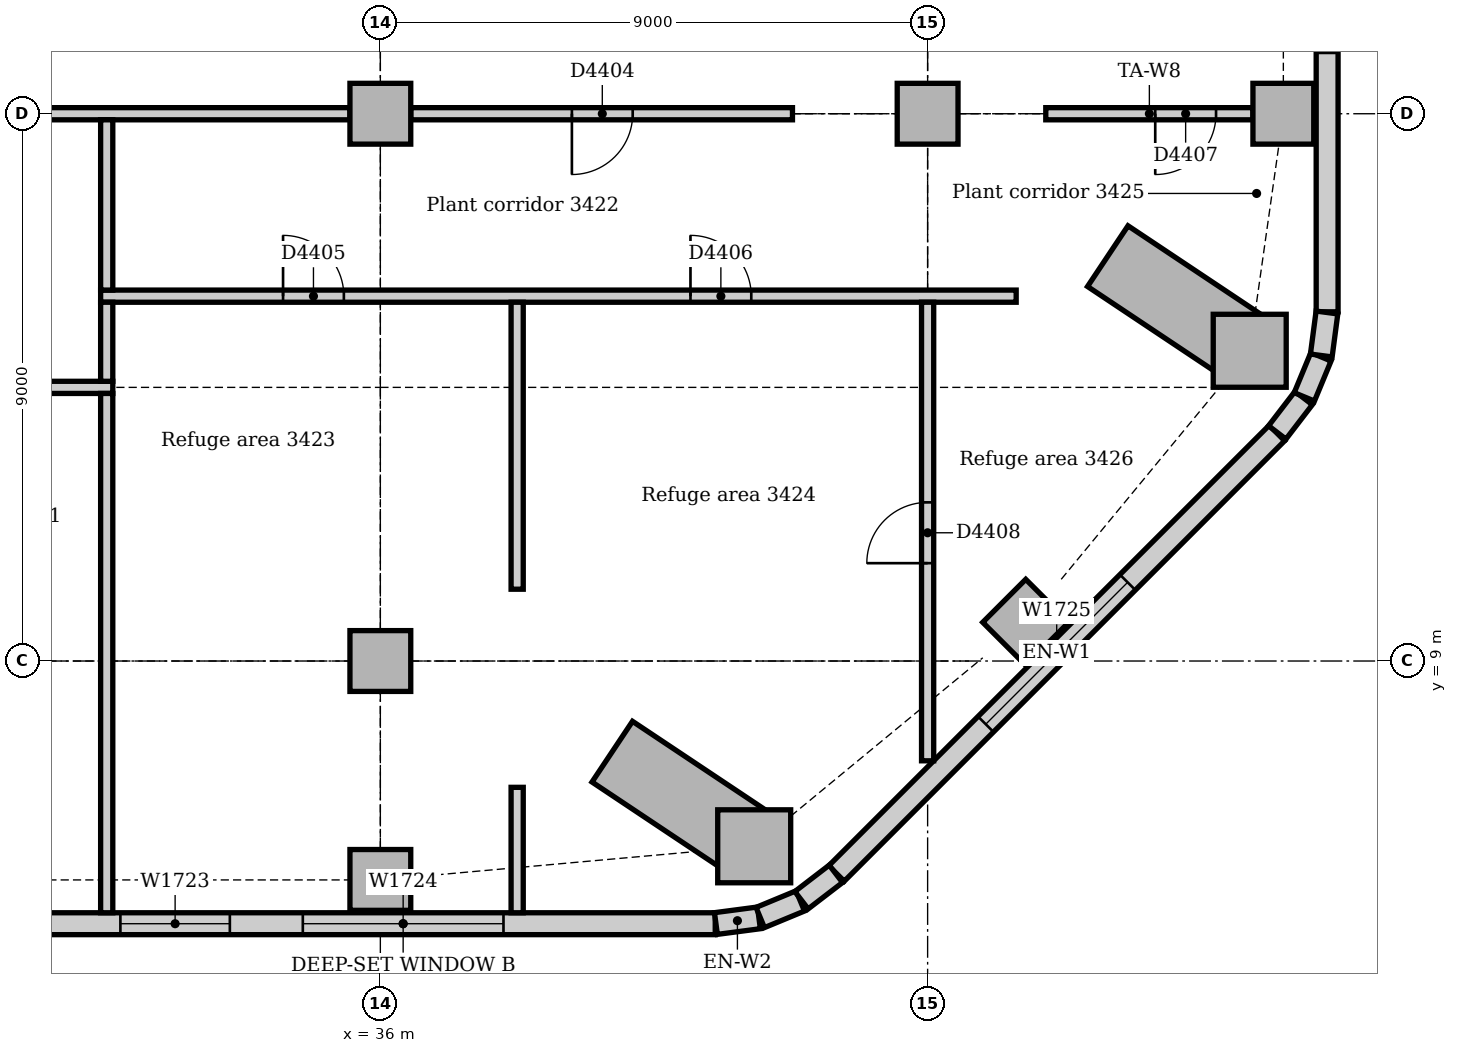
"""IFC4 building model, lengths in metres.
Left out: names, types, materials, properties, quantities, classifications, styles, units other than length and angle.
Written with IfcOpenShell. Run it as: python <this file> out.ifc"""

import sys

from ifc_helpers import new_model, si_unit, direction, frame, frame_2d, origin, origin_2d, place, context, subcontext, project, spatial, rectangle, extrude, element, fill, save


model = new_model("IFC4")
c1 = context("Model", 3, precision=1e-05, world=origin(), true_north=direction((0.0, 1.0)))
c2 = subcontext(c1, "Body", "Model", "MODEL_VIEW")
j1 = project(units=[si_unit("LENGTHUNIT", "METRE"), si_unit("PLANEANGLEUNIT", "RADIAN")], contexts=[c1])
p1 = place(None, origin())
s1 = spatial("IfcSite", under=j1, at=p1, CompositionType="ELEMENT")
p2 = place(p1, origin())
s2 = spatial("IfcBuilding", under=s1, at=p2, CompositionType="ELEMENT")
p3 = place(p2, frame((0.0, 0.0, 144.0)))
s3 = spatial("IfcBuildingStorey", under=s2, at=p3, CompositionType="ELEMENT", Elevation=144.0)
for number, where, z_axis, x_axis in (
    (1, (42.148, 5.953, 0.0), (0.0, 0.0, 1.0), (1.0, 0.0, 0.0)),
    (2, (50.297, 14.102, 0.0), (0.0, 0.0, 1.0), (1.0, 0.0, 0.0)),
):
    element("IfcColumn", number, at=place(p3, frame(where, z_axis=z_axis, x_axis=x_axis)), inside=s3, PredefinedType="COLUMN", context=c2, shape_type="SweptSolid", body=[
        extrude(rectangle(XDim=1.2, YDim=1.2, at=origin_2d()), origin(), (0.0, 0.0, 1.0), 4.85),
    ])
for number, where, z_axis, x_axis in (
    (3, (36.0, 5.4, 0.0), (0.0, 0.0, 1.0), (1.0, 0.0, 0.0)),
    (4, (46.614, 9.636, 0.0), (0.0, 0.0, 1.0), (0.707, 0.707, 0.0)),
    (5, (50.85, 18.0, 0.0), (0.0, 0.0, 1.0), (1.0, 0.0, 0.0)),
    (6, (36.0, 9.0, 0.0), (0.0, 0.0, 1.0), (1.0, 0.0, 0.0)),
    (7, (36.0, 18.0, 0.0), (0.0, 0.0, 1.0), (1.0, 0.0, 0.0)),
    (8, (45.0, 18.0, 0.0), (0.0, 0.0, 1.0), (1.0, 0.0, 0.0)),
):
    element("IfcColumn", number, at=place(p3, frame(where, z_axis=z_axis, x_axis=x_axis)), inside=s3, PredefinedType="COLUMN", context=c2, shape_type="SweptSolid", body=[
        extrude(rectangle(XDim=1.0, YDim=1.0, at=origin_2d()), origin(), (0.0, 0.0, 1.0), 4.85),
    ])
p4 = place(p3, frame((4.243, 4.68, 0.0), z_axis=(0.0, 0.0, 1.0), x_axis=(1.0, 0.0, 0.0)))
e9 = element("IfcWall", 9, at=p4, inside=s3, PredefinedType="STANDARD", context=c2, shape_type="SweptSolid", body=[
    extrude(rectangle(XDim=37.265, YDim=0.36, at=frame_2d((18.632, 0.0))), origin(), (0.0, 0.0, 1.0), 4.85),
])
p5 = place(p4, frame((9.482, 0.0, 0.9)))
e10 = element("IfcOpeningElement", 10, at=p5, cuts=e9, PredefinedType="OPENING", context=c2, shape_type="SweptSolid", body=[
    extrude(rectangle(XDim=1.8, YDim=2.2, at=frame_2d((0.9, 1.1))), frame((0.0, 0.19, 0.0), z_axis=(0.0, -1.0, 0.0), x_axis=(1.0, 0.0, 0.0)), (0.0, 0.0, 1.0), 0.38),
])
p6 = place(p4, frame((18.482, 0.0, 0.9)))
e11 = element("IfcOpeningElement", 11, at=p6, cuts=e9, PredefinedType="OPENING", context=c2, shape_type="SweptSolid", body=[
    extrude(rectangle(XDim=1.8, YDim=2.2, at=frame_2d((0.9, 1.1))), frame((0.0, 0.19, 0.0), z_axis=(0.0, -1.0, 0.0), x_axis=(1.0, 0.0, 0.0)), (0.0, 0.0, 1.0), 0.38),
])
p7 = place(p4, frame((27.482, 0.0, 0.9)))
e12 = element("IfcOpeningElement", 12, at=p7, cuts=e9, PredefinedType="OPENING", context=c2, shape_type="SweptSolid", body=[
    extrude(rectangle(XDim=1.8, YDim=2.2, at=frame_2d((0.9, 1.1))), frame((0.0, 0.19, 0.0), z_axis=(0.0, -1.0, 0.0), x_axis=(1.0, 0.0, 0.0)), (0.0, 0.0, 1.0), 0.38),
])
p8 = place(p4, frame((30.482, 0.0, 0.9)))
e13 = element("IfcOpeningElement", 13, at=p8, cuts=e9, PredefinedType="OPENING", context=c2, shape_type="SweptSolid", body=[
    extrude(rectangle(XDim=3.3, YDim=2.2, at=frame_2d((1.65, 1.1))), frame((0.0, 0.19, 0.0), z_axis=(0.0, -1.0, 0.0), x_axis=(1.0, 0.0, 0.0)), (0.0, 0.0, 1.0), 0.38),
])
p9 = place(p3, frame((43.501, 5.506, 0.0), z_axis=(0.0, 0.0, 1.0), x_axis=(0.707106781187, 0.707106781187, 0.0)))
e14 = element("IfcWall", 14, at=p9, inside=s3, PredefinedType="STANDARD", context=c2, shape_type="SweptSolid", body=[
    extrude(rectangle(XDim=10.243, YDim=0.36, at=frame_2d((5.121, 0.0))), origin(), (0.0, 0.0, 1.0), 4.85),
])
p10 = place(p9, frame((3.471, 0.0, 0.9)))
e15 = element("IfcOpeningElement", 15, at=p10, cuts=e14, PredefinedType="OPENING", context=c2, shape_type="SweptSolid", body=[
    extrude(rectangle(XDim=3.3, YDim=2.2, at=frame_2d((1.65, 1.1))), frame((0.0, 0.19, 0.0), z_axis=(0.0, -1.0, 0.0), x_axis=(1.0, 0.0, 0.0)), (0.0, 0.0, 1.0), 0.38),
])
p11 = place(p3, frame((51.57, 14.743, 0.0), z_axis=(0.0, 0.0, 1.0), x_axis=(0.0, 1.0, 0.0)))
e16 = element("IfcWall", 16, at=p11, inside=s3, PredefinedType="STANDARD", context=c2, shape_type="SweptSolid", body=[
    extrude(rectangle(XDim=24.515, YDim=0.36, at=frame_2d((12.257, 0.0))), origin(), (0.0, 0.0, 1.0), 4.85),
])
p12 = place(p11, frame((4.257, 0.0, 0.9)))
e17 = element("IfcOpeningElement", 17, at=p12, cuts=e16, PredefinedType="OPENING", context=c2, shape_type="SweptSolid", body=[
    extrude(rectangle(XDim=1.8, YDim=2.2, at=frame_2d((0.9, 1.1))), frame((0.0, 0.19, 0.0), z_axis=(0.0, -1.0, 0.0), x_axis=(1.0, 0.0, 0.0)), (0.0, 0.0, 1.0), 0.38),
])
p13 = place(p11, frame((8.007, 0.0, 1.2)))
e18 = element("IfcOpeningElement", 18, at=p13, cuts=e16, PredefinedType="OPENING", context=c2, shape_type="SweptSolid", body=[
    extrude(rectangle(XDim=1.8, YDim=1.2, at=frame_2d((0.9, 0.6))), frame((0.0, 0.19, 0.0), z_axis=(0.0, -1.0, 0.0), x_axis=(1.0, 0.0, 0.0)), (0.0, 0.0, 1.0), 0.38),
])
p14 = place(p11, frame((14.682, 0.0, 0.9)))
e19 = element("IfcOpeningElement", 19, at=p14, cuts=e16, PredefinedType="OPENING", context=c2, shape_type="SweptSolid", body=[
    extrude(rectangle(XDim=1.8, YDim=2.2, at=frame_2d((0.9, 1.1))), frame((0.0, 0.19, 0.0), z_axis=(0.0, -1.0, 0.0), x_axis=(1.0, 0.0, 0.0)), (0.0, 0.0, 1.0), 0.38),
])
p15 = place(p11, frame((17.732, 0.0, 0.9)))
e20 = element("IfcOpeningElement", 20, at=p15, cuts=e16, PredefinedType="OPENING", context=c2, shape_type="SweptSolid", body=[
    extrude(rectangle(XDim=1.8, YDim=2.2, at=frame_2d((0.9, 1.1))), frame((0.0, 0.19, 0.0), z_axis=(0.0, -1.0, 0.0), x_axis=(1.0, 0.0, 0.0)), (0.0, 0.0, 1.0), 0.38),
])
for number, where, z_axis, x_axis in (
    (21, (41.519, 4.683, 0.0), (0.0, 0.0, 1.0), (0.991, 0.131, 0.0)),
    (22, (42.247, 4.782, 0.0), (0.0, 0.0, 1.0), (0.924, 0.383, 0.0)),
):
    element("IfcWall", number, at=place(p3, frame(where, z_axis=z_axis, x_axis=x_axis)), inside=s3, PredefinedType="STANDARD", context=c2, shape_type="SweptSolid", body=[
        extrude(rectangle(XDim=0.713, YDim=0.36, at=frame_2d((0.356, 0.0))), origin(), (0.0, 0.0, 1.0), 4.85),
    ])
for number, where, z_axis, x_axis in (
    (23, (42.925, 5.066, 0.0), (0.0, 0.0, 1.0), (0.793, 0.609, 0.0)),
    (24, (50.75, 12.759, 0.0), (0.0, 0.0, 1.0), (0.609, 0.793, 0.0)),
):
    element("IfcWall", number, at=place(p3, frame(where, z_axis=z_axis, x_axis=x_axis)), inside=s3, PredefinedType="STANDARD", context=c2, shape_type="SweptSolid", body=[
        extrude(rectangle(XDim=0.713, YDim=0.36, at=frame_2d((0.357, 0.0))), origin(), (0.0, 0.0, 1.0), 4.85),
    ])
for number, where, z_axis, x_axis in (
    (25, (51.195, 13.344, 0.0), (0.0, 0.0, 1.0), (0.383, 0.924, 0.0)),
    (26, (51.474, 14.024, 0.0), (0.0, 0.0, 1.0), (0.131, 0.991, 0.0)),
):
    element("IfcWall", number, at=place(p3, frame(where, z_axis=z_axis, x_axis=x_axis)), inside=s3, PredefinedType="STANDARD", context=c2, shape_type="SweptSolid", body=[
        extrude(rectangle(XDim=0.713, YDim=0.36, at=frame_2d((0.356, 0.0))), origin(), (0.0, 0.0, 1.0), 4.85),
    ])
p16 = place(p3, frame((46.943, 18.0, 0.0), z_axis=(0.0, 0.0, 1.0), x_axis=(1.0, 0.0, 0.0)))
e27 = element("IfcWall", 27, at=p16, inside=s3, PredefinedType="PARTITIONING", context=c2, shape_type="SweptSolid", body=[
    extrude(rectangle(XDim=3.407, YDim=0.2, at=frame_2d((1.703, 0.0))), origin(), (0.0, 0.0, 1.0), 4.35),
])
p17 = place(p16, frame((1.8, 0.0, 0.0)))
e28 = element("IfcOpeningElement", 28, at=p17, cuts=e27, PredefinedType="OPENING", context=c2, shape_type="SweptSolid", body=[
    extrude(rectangle(XDim=1.0, YDim=2.1, at=frame_2d((0.5, 1.05))), frame((0.0, 0.11, 0.0), z_axis=(0.0, -1.0, 0.0), x_axis=(1.0, 0.0, 0.0)), (0.0, 0.0, 1.0), 0.22),
])
p18 = place(p3, frame((36.5, 18.0, 0.0), z_axis=(0.0, 0.0, 1.0), x_axis=(1.0, 0.0, 0.0)))
e29 = element("IfcWall", 29, at=p18, inside=s3, PredefinedType="PARTITIONING", context=c2, shape_type="SweptSolid", body=[
    extrude(rectangle(XDim=6.277, YDim=0.2, at=frame_2d((3.139, 0.0))), origin(), (0.0, 0.0, 1.0), 4.35),
])
p19 = place(p18, frame((2.65, 0.0, 0.0)))
e30 = element("IfcOpeningElement", 30, at=p19, cuts=e29, PredefinedType="OPENING", context=c2, shape_type="SweptSolid", body=[
    extrude(rectangle(XDim=1.0, YDim=2.1, at=frame_2d((0.5, 1.05))), frame((0.0, 0.11, 0.0), z_axis=(0.0, -1.0, 0.0), x_axis=(1.0, 0.0, 0.0)), (0.0, 0.0, 1.0), 0.22),
])
p20 = place(p3, frame((27.5, 18.0, 0.0), z_axis=(0.0, 0.0, 1.0), x_axis=(1.0, 0.0, 0.0)))
e31 = element("IfcWall", 31, at=p20, inside=s3, PredefinedType="PARTITIONING", context=c2, shape_type="SweptSolid", body=[
    extrude(rectangle(XDim=8.0, YDim=0.2, at=frame_2d((4.0, 0.0))), origin(), (0.0, 0.0, 1.0), 4.262),
])
p21 = place(p3, frame((0.36, 13.5, 0.0), z_axis=(0.0, 0.0, 1.0), x_axis=(1.0, 0.0, 0.0)))
e32 = element("IfcWall", 32, at=p21, inside=s3, PredefinedType="PARTITIONING", context=c2, shape_type="SweptSolid", body=[
    extrude(rectangle(XDim=31.24, YDim=0.2, at=frame_2d((15.62, 0.0))), origin(), (0.0, 0.0, 1.0), 4.4),
])
p22 = place(p21, frame((2.75, 0.0, 0.0)))
e33 = element("IfcOpeningElement", 33, at=p22, cuts=e32, PredefinedType="OPENING", context=c2, shape_type="SweptSolid", body=[
    extrude(rectangle(XDim=1.0, YDim=2.1, at=frame_2d((0.5, 1.05))), frame((0.0, 0.11, 0.0), z_axis=(0.0, -1.0, 0.0), x_axis=(1.0, 0.0, 0.0)), (0.0, 0.0, 1.0), 0.22),
])
p23 = place(p21, frame((9.24, 0.0, 0.0)))
e34 = element("IfcOpeningElement", 34, at=p23, cuts=e32, PredefinedType="OPENING", context=c2, shape_type="SweptSolid", body=[
    extrude(rectangle(XDim=1.0, YDim=2.1, at=frame_2d((0.5, 1.05))), frame((0.0, 0.11, 0.0), z_axis=(0.0, -1.0, 0.0), x_axis=(1.0, 0.0, 0.0)), (0.0, 0.0, 1.0), 0.22),
])
p24 = place(p21, frame((17.14, 0.0, 0.0)))
e35 = element("IfcOpeningElement", 35, at=p24, cuts=e32, PredefinedType="OPENING", context=c2, shape_type="SweptSolid", body=[
    extrude(rectangle(XDim=1.0, YDim=2.1, at=frame_2d((0.5, 1.05))), frame((0.0, 0.11, 0.0), z_axis=(0.0, -1.0, 0.0), x_axis=(1.0, 0.0, 0.0)), (0.0, 0.0, 1.0), 0.22),
])
p25 = place(p21, frame((26.09, 0.0, 0.0)))
e36 = element("IfcOpeningElement", 36, at=p25, cuts=e32, PredefinedType="OPENING", context=c2, shape_type="SweptSolid", body=[
    extrude(rectangle(XDim=1.0, YDim=2.1, at=frame_2d((0.5, 1.05))), frame((0.0, 0.11, 0.0), z_axis=(0.0, -1.0, 0.0), x_axis=(1.0, 0.0, 0.0)), (0.0, 0.0, 1.0), 0.22),
])
p26 = place(p3, frame((31.4, 15.0, 0.0), z_axis=(0.0, 0.0, 1.0), x_axis=(1.0, 0.0, 0.0)))
e37 = element("IfcWall", 37, at=p26, inside=s3, PredefinedType="PARTITIONING", context=c2, shape_type="SweptSolid", body=[
    extrude(rectangle(XDim=15.056, YDim=0.2, at=frame_2d((7.528, 0.0))), origin(), (0.0, 0.0, 1.0), 4.85),
])
p27 = place(p26, frame((3.0, 0.0, 0.0)))
e38 = element("IfcOpeningElement", 38, at=p27, cuts=e37, PredefinedType="OPENING", context=c2, shape_type="SweptSolid", body=[
    extrude(rectangle(XDim=1.0, YDim=2.1, at=frame_2d((0.5, 1.05))), frame((0.0, 0.11, 0.0), z_axis=(0.0, -1.0, 0.0), x_axis=(1.0, 0.0, 0.0)), (0.0, 0.0, 1.0), 0.22),
])
p28 = place(p26, frame((9.7, 0.0, 0.0)))
e39 = element("IfcOpeningElement", 39, at=p28, cuts=e37, PredefinedType="OPENING", context=c2, shape_type="SweptSolid", body=[
    extrude(rectangle(XDim=1.0, YDim=2.1, at=frame_2d((0.5, 1.05))), frame((0.0, 0.11, 0.0), z_axis=(0.0, -1.0, 0.0), x_axis=(1.0, 0.0, 0.0)), (0.0, 0.0, 1.0), 0.22),
])
p29 = place(p3, frame((31.5, 15.1, 0.0), z_axis=(0.0, 0.0, 1.0), x_axis=(0.0, 1.0, 0.0)))
e40 = element("IfcWall", 40, at=p29, inside=s3, PredefinedType="PARTITIONING", context=c2, shape_type="SweptSolid", body=[
    extrude(rectangle(XDim=2.8, YDim=0.2, at=frame_2d((1.4, 0.0))), origin(), (0.0, 0.0, 1.0), 4.85),
])
p30 = place(p3, frame((31.5, 13.6, 0.0), z_axis=(0.0, 0.0, 1.0), x_axis=(0.0, 1.0, 0.0)))
e41 = element("IfcWall", 41, at=p30, inside=s3, PredefinedType="PARTITIONING", context=c2, shape_type="SweptSolid", body=[
    extrude(rectangle(XDim=1.3, YDim=0.2, at=frame_2d((0.65, 0.0))), origin(), (0.0, 0.0, 1.0), 4.85),
])
p31 = place(p3, frame((31.5, 4.86, 0.0), z_axis=(0.0, 0.0, 1.0), x_axis=(0.0, 1.0, 0.0)))
e42 = element("IfcWall", 42, at=p31, inside=s3, PredefinedType="PARTITIONING", context=c2, shape_type="SweptSolid", body=[
    extrude(rectangle(XDim=8.54, YDim=0.2, at=frame_2d((4.27, 0.0))), origin(), (0.0, 0.0, 1.0), 4.85),
])
p32 = place(p3, frame((45.0, 7.359, 0.0), z_axis=(0.0, 0.0, 1.0), x_axis=(0.0, 1.0, 0.0)))
e43 = element("IfcWall", 43, at=p32, inside=s3, PredefinedType="PARTITIONING", context=c2, shape_type="SweptSolid", body=[
    extrude(rectangle(XDim=7.541, YDim=0.2, at=frame_2d((3.771, 0.0))), origin(), (0.0, 0.0, 1.0), 4.85),
])
p33 = place(p32, frame((3.25, 0.0, 0.0)))
e44 = element("IfcOpeningElement", 44, at=p33, cuts=e43, PredefinedType="OPENING", context=c2, shape_type="SweptSolid", body=[
    extrude(rectangle(XDim=1.0, YDim=2.1, at=frame_2d((0.5, 1.05))), frame((0.0, 0.11, 0.0), z_axis=(0.0, -1.0, 0.0), x_axis=(1.0, 0.0, 0.0)), (0.0, 0.0, 1.0), 0.22),
])
p34 = place(p3, frame((38.25, 10.181, 0.0), z_axis=(0.0, 0.0, 1.0), x_axis=(0.0, 1.0, 0.0)))
e45 = element("IfcWall", 45, at=p34, inside=s3, PredefinedType="PARTITIONING", context=c2, shape_type="SweptSolid", body=[
    extrude(rectangle(XDim=4.719, YDim=0.2, at=frame_2d((2.36, 0.0))), origin(), (0.0, 0.0, 1.0), 4.85),
])
p35 = place(p3, frame((38.25, 4.86, 0.0), z_axis=(0.0, 0.0, 1.0), x_axis=(0.0, 1.0, 0.0)))
e46 = element("IfcWall", 46, at=p35, inside=s3, PredefinedType="PARTITIONING", context=c2, shape_type="SweptSolid", body=[
    extrude(rectangle(XDim=2.063, YDim=0.2, at=frame_2d((1.031, 0.0))), origin(), (0.0, 0.0, 1.0), 4.85),
])
p36 = place(p7, origin())
e47 = element("IfcWindow", 47, at=p36, inside=s3, PartitioningType="SINGLE_PANEL", PredefinedType="WINDOW", context=c2, shape_type="SweptSolid", body=[
    extrude(rectangle(XDim=1.8, YDim=2.2, at=frame_2d((0.9, 1.1))), frame((0.0, 0.13, 0.0), z_axis=(0.0, -1.0, 0.0), x_axis=(1.0, 0.0, 0.0)), (0.0, 0.0, 1.0), 0.06),
])
fill(e12, e47)
p37 = place(p8, origin())
e48 = element("IfcWindow", 48, at=p37, inside=s3, PartitioningType="SINGLE_PANEL", PredefinedType="WINDOW", context=c2, shape_type="SweptSolid", body=[
    extrude(rectangle(XDim=3.3, YDim=2.2, at=frame_2d((1.65, 1.1))), frame((0.0, 0.13, 0.0), z_axis=(0.0, -1.0, 0.0), x_axis=(1.0, 0.0, 0.0)), (0.0, 0.0, 1.0), 0.06),
])
fill(e13, e48)
p38 = place(p10, origin())
e49 = element("IfcWindow", 49, at=p38, inside=s3, PartitioningType="SINGLE_PANEL", PredefinedType="WINDOW", context=c2, shape_type="SweptSolid", body=[
    extrude(rectangle(XDim=3.3, YDim=2.2, at=frame_2d((1.65, 1.1))), frame((0.0, 0.13, 0.0), z_axis=(0.0, -1.0, 0.0), x_axis=(1.0, 0.0, 0.0)), (0.0, 0.0, 1.0), 0.06),
])
fill(e15, e49)
p39 = place(p19, frame((1.0, 0.0, 0.0), z_axis=(0.0, 0.0, 1.0), x_axis=(-1.0, 0.0, 0.0)))
e50 = element("IfcDoor", 50, at=p39, inside=s3, OperationType="SINGLE_SWING_RIGHT", PredefinedType="DOOR", context=c2, shape_type="SweptSolid", body=[
    extrude(rectangle(XDim=1.0, YDim=2.1, at=frame_2d((0.5, 1.05))), frame((0.0, 0.025, 0.0), z_axis=(0.0, -1.0, 0.0), x_axis=(1.0, 0.0, 0.0)), (0.0, 0.0, 1.0), 0.05),
])
fill(e30, e50)
p40 = place(p27, origin())
e51 = element("IfcDoor", 51, at=p40, inside=s3, OperationType="SINGLE_SWING_LEFT", PredefinedType="DOOR", context=c2, shape_type="SweptSolid", body=[
    extrude(rectangle(XDim=1.0, YDim=2.1, at=frame_2d((0.5, 1.05))), frame((0.0, 0.025, 0.0), z_axis=(0.0, -1.0, 0.0), x_axis=(1.0, 0.0, 0.0)), (0.0, 0.0, 1.0), 0.05),
])
fill(e38, e51)
p41 = place(p28, origin())
e52 = element("IfcDoor", 52, at=p41, inside=s3, OperationType="SINGLE_SWING_LEFT", PredefinedType="DOOR", context=c2, shape_type="SweptSolid", body=[
    extrude(rectangle(XDim=1.0, YDim=2.1, at=frame_2d((0.5, 1.05))), frame((0.0, 0.025, 0.0), z_axis=(0.0, -1.0, 0.0), x_axis=(1.0, 0.0, 0.0)), (0.0, 0.0, 1.0), 0.05),
])
fill(e39, e52)
p42 = place(p17, frame((1.0, 0.0, 0.0), z_axis=(0.0, 0.0, 1.0), x_axis=(-1.0, 0.0, 0.0)))
e53 = element("IfcDoor", 53, at=p42, inside=s3, OperationType="SINGLE_SWING_RIGHT", PredefinedType="DOOR", context=c2, shape_type="SweptSolid", body=[
    extrude(rectangle(XDim=1.0, YDim=2.1, at=frame_2d((0.5, 1.05))), frame((0.0, 0.025, 0.0), z_axis=(0.0, -1.0, 0.0), x_axis=(1.0, 0.0, 0.0)), (0.0, 0.0, 1.0), 0.05),
])
fill(e28, e53)
p43 = place(p33, origin())
e54 = element("IfcDoor", 54, at=p43, inside=s3, OperationType="SINGLE_SWING_LEFT", PredefinedType="DOOR", context=c2, shape_type="SweptSolid", body=[
    extrude(rectangle(XDim=1.0, YDim=2.1, at=frame_2d((0.5, 1.05))), frame((0.0, 0.025, 0.0), z_axis=(0.0, -1.0, 0.0), x_axis=(1.0, 0.0, 0.0)), (0.0, 0.0, 1.0), 0.05),
])
fill(e44, e54)
save(model, sys.argv[1])
